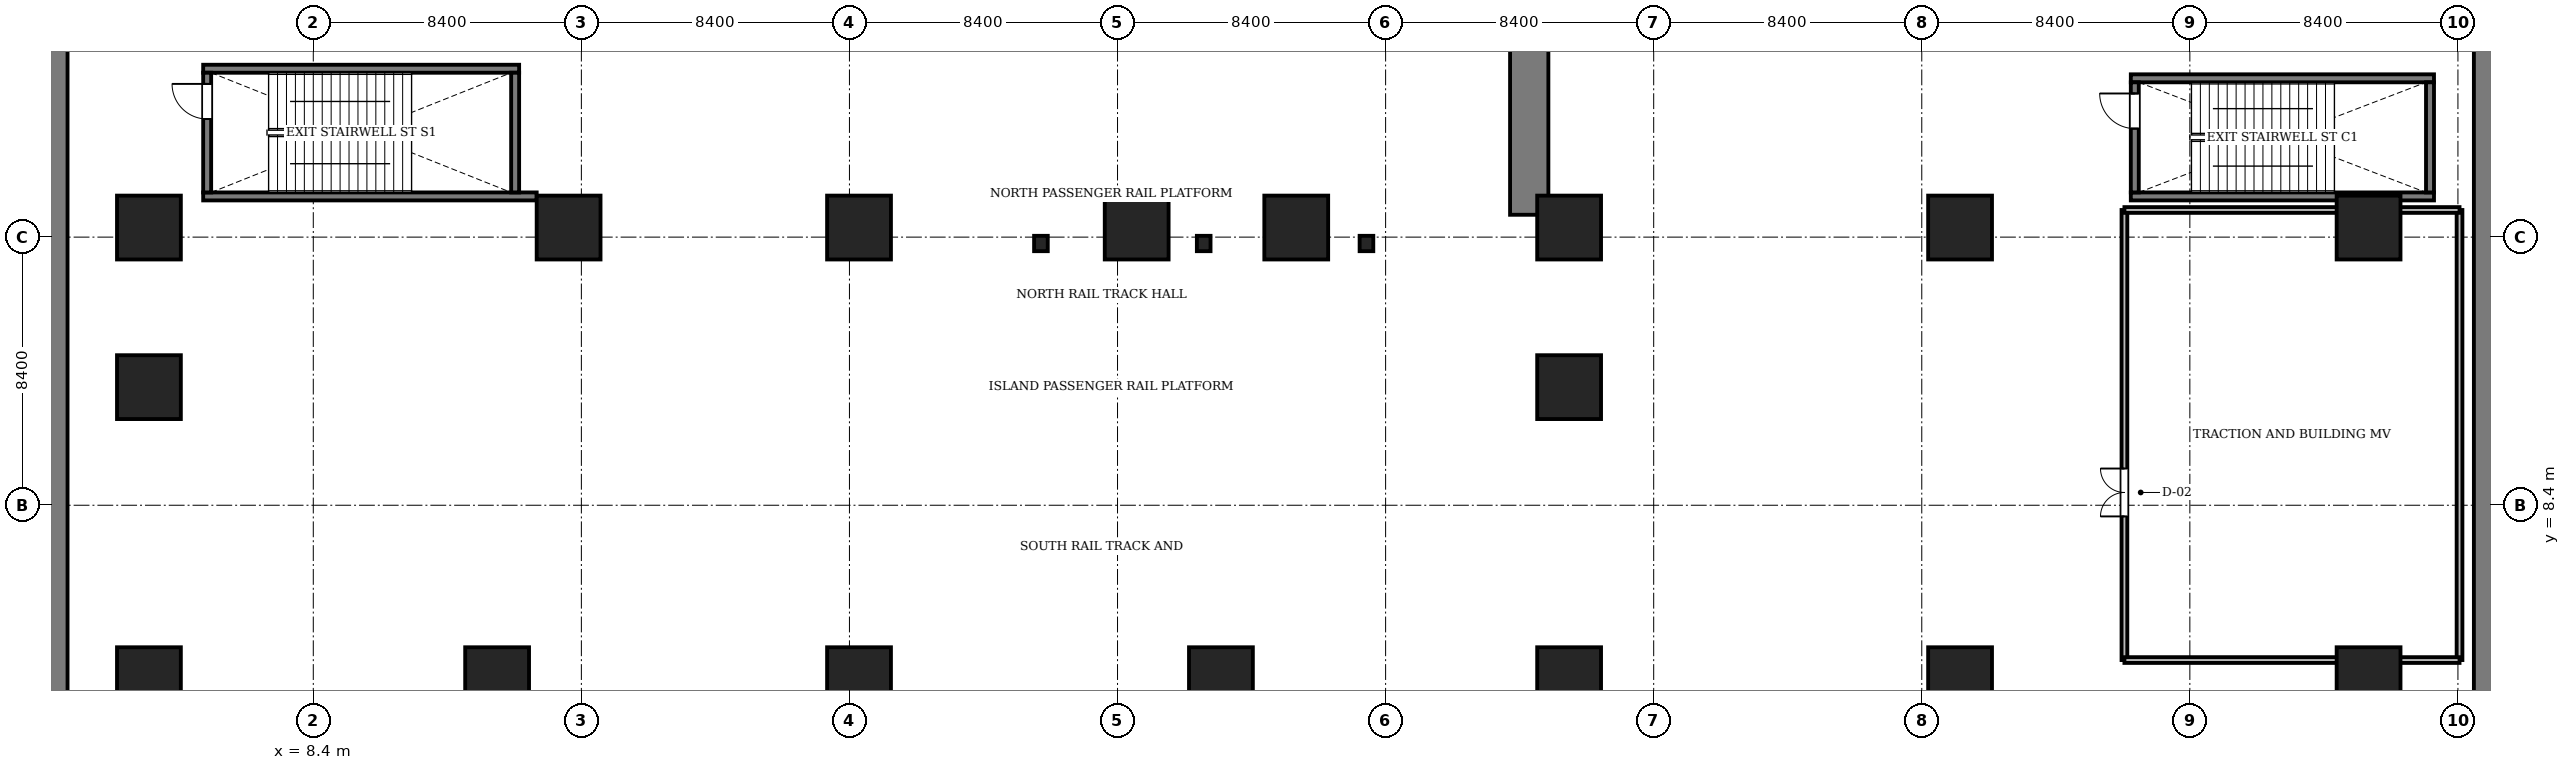
"""IFC4 building model, lengths in metres.
Left out: names, types, materials, properties, quantities, classifications, styles, units other than length and angle.
Written with IfcOpenShell. Run it as: python <this file> out.ifc"""

import sys

from ifc_helpers import new_model, si_unit, direction, frame, frame_2d, origin, origin_2d, place, context, subcontext, project, spatial, rectangle, i_section, extrude, source, transform, mapped, element, fill, save


model = new_model("IFC4")
c1 = context("Model", 3, precision=1e-05, world=origin(), true_north=direction((0.0, 1.0)))
c2 = subcontext(c1, "Body", "Model", "MODEL_VIEW")
j1 = project(units=[si_unit("LENGTHUNIT", "METRE"), si_unit("PLANEANGLEUNIT", "RADIAN")], contexts=[c1])
p1 = place(None, origin())
s1 = spatial("IfcSite", under=j1, at=p1, CompositionType="ELEMENT")
p2 = place(p1, origin())
s2 = spatial("IfcBuilding", under=s1, at=p2, CompositionType="ELEMENT")
p3 = place(p2, frame((0.0, 0.0, -6.0)))
s3 = spatial("IfcBuildingStorey", under=s2, at=p3, CompositionType="ELEMENT", Elevation=-6.0)
m1 = source(origin(), c2, "Body", "SweptSolid", [
    extrude(rectangle(XDim=13.15, YDim=1.2, at=frame_2d((6.575, 0.0))), origin(), (0.0, 0.0, 1.0), 5.6),
])
p4 = place(p3, frame((46.5, 17.5, 0.0), z_axis=(0.0, 0.0, 1.0), x_axis=(0.0, 1.0, 0.0)))
e1 = element("IfcWall", 1, at=p4, inside=s3, PredefinedType="SHEAR", context=c2, shape_type="MappedRepresentation", body=[
    mapped(m1, transform((0.0, 0.0, 0.0), scale=1.0)),
])
m2 = source(origin(), c2, "Body", "SweptSolid", [
    extrude(rectangle(XDim=49.0, YDim=0.7, at=frame_2d((24.5, 0.0))), origin(), (0.0, 0.0, 1.0), 5.6),
])
for number, where, z_axis, x_axis in (
    (2, (0.35, 0.7, 0.0), (0.0, 0.0, 1.0), (0.0, 1.0, 0.0)),
    (3, (76.45, 0.7, 0.0), (0.0, 0.0, 1.0), (0.0, 1.0, 0.0)),
):
    element("IfcWall", number, at=place(p3, frame(where, z_axis=z_axis, x_axis=x_axis)), inside=s3, PredefinedType="SOLIDWALL", context=c2, shape_type="MappedRepresentation", body=[
        mapped(m2, transform((0.0, 0.0, 0.0), scale=1.0)),
    ])
m3 = source(origin(), c2, "Body", "SweptSolid", [
    extrude(i_section(OverallWidth=0.428, OverallDepth=0.481, WebThickness=0.04, FlangeThickness=0.063, FilletRadius=0.015, at=origin_2d()), origin(), (0.0, 0.0, 1.0), 5.6),
])
for number, where, z_axis, x_axis in (
    (4, (31.2, 16.6, 0.0), (0.0, 0.0, 1.0), (1.0, 0.0, 0.0)),
    (5, (36.3, 16.6, 0.0), (0.0, 0.0, 1.0), (1.0, 0.0, 0.0)),
    (6, (41.4, 16.6, 0.0), (0.0, 0.0, 1.0), (1.0, 0.0, 0.0)),
):
    element("IfcColumn", number, at=place(p3, frame(where, z_axis=z_axis, x_axis=x_axis)), inside=s3, PredefinedType="COLUMN", context=c2, shape_type="MappedRepresentation", body=[
        mapped(m3, transform((0.0, 0.0, 0.0), scale=1.0)),
    ])
m4 = source(origin(), c2, "Body", "SweptSolid", [
    extrude(rectangle(XDim=2.0, YDim=2.0, at=origin_2d()), origin(), (0.0, 0.0, 1.0), 5.6),
])
for number, where, z_axis, x_axis in (
    (7, (3.25, 2.95, 0.0), (0.0, 0.0, 1.0), (1.0, 0.0, 0.0)),
    (8, (14.16, 2.95, 0.0), (0.0, 0.0, 1.0), (1.0, 0.0, 0.0)),
    (9, (25.5, 2.95, 0.0), (0.0, 0.0, 1.0), (1.0, 0.0, 0.0)),
    (10, (36.84, 2.95, 0.0), (0.0, 0.0, 1.0), (1.0, 0.0, 0.0)),
    (11, (47.75, 2.95, 0.0), (0.0, 0.0, 1.0), (1.0, 0.0, 0.0)),
    (12, (60.0, 2.95, 0.0), (0.0, 0.0, 1.0), (1.0, 0.0, 0.0)),
    (13, (72.8, 2.95, 0.0), (0.0, 0.0, 1.0), (1.0, 0.0, 0.0)),
    (14, (3.25, 12.1, 0.0), (0.0, 0.0, 1.0), (1.0, 0.0, 0.0)),
    (15, (47.75, 12.1, 0.0), (0.0, 0.0, 1.0), (1.0, 0.0, 0.0)),
    (16, (3.25, 17.1, 0.0), (0.0, 0.0, 1.0), (1.0, 0.0, 0.0)),
    (17, (16.4, 17.1, 0.0), (0.0, 0.0, 1.0), (1.0, 0.0, 0.0)),
    (18, (25.5, 17.1, 0.0), (0.0, 0.0, 1.0), (1.0, 0.0, 0.0)),
    (19, (34.2, 17.1, 0.0), (0.0, 0.0, 1.0), (1.0, 0.0, 0.0)),
    (20, (39.2, 17.1, 0.0), (0.0, 0.0, 1.0), (1.0, 0.0, 0.0)),
    (21, (47.75, 17.1, 0.0), (0.0, 0.0, 1.0), (1.0, 0.0, 0.0)),
    (22, (60.0, 17.1, 0.0), (0.0, 0.0, 1.0), (1.0, 0.0, 0.0)),
    (23, (72.8, 17.1, 0.0), (0.0, 0.0, 1.0), (1.0, 0.0, 0.0)),
):
    element("IfcColumn", number, at=place(p3, frame(where, z_axis=z_axis, x_axis=x_axis)), inside=s3, PredefinedType="COLUMN", context=c2, shape_type="MappedRepresentation", body=[
        mapped(m4, transform((0.0, 0.0, 0.0), scale=1.0)),
    ])
m5 = source(origin(), c2, "Body", "SweptSolid", [
    extrude(rectangle(XDim=10.45, YDim=0.25, at=frame_2d((5.225, 0.0))), origin(), (0.0, 0.0, 1.0), 5.8),
])
p5 = place(p3, frame((4.95, 18.075, 0.0), z_axis=(0.0, 0.0, 1.0), x_axis=(1.0, 0.0, 0.0)))
e24 = element("IfcWall", 24, at=p5, inside=s3, PredefinedType="SOLIDWALL", context=c2, shape_type="MappedRepresentation", body=[
    mapped(m5, transform((0.0, 0.0, 0.0), scale=1.0)),
])
m6 = source(origin(), c2, "Body", "SweptSolid", [
    extrude(rectangle(XDim=9.9, YDim=0.25, at=frame_2d((4.95, 0.0))), origin(), (0.0, 0.0, 1.0), 5.8),
])
p6 = place(p3, frame((4.95, 22.075, 0.0), z_axis=(0.0, 0.0, 1.0), x_axis=(1.0, 0.0, 0.0)))
e25 = element("IfcWall", 25, at=p6, inside=s3, PredefinedType="SOLIDWALL", context=c2, shape_type="MappedRepresentation", body=[
    mapped(m6, transform((0.0, 0.0, 0.0), scale=1.0)),
])
m7 = source(origin(), c2, "Body", "SweptSolid", [
    extrude(rectangle(XDim=3.75, YDim=0.25, at=frame_2d((1.875, 0.0))), origin(), (0.0, 0.0, 1.0), 5.8),
])
p7 = place(p3, frame((14.725, 18.2, 0.0), z_axis=(0.0, 0.0, 1.0), x_axis=(0.0, 1.0, 0.0)))
e26 = element("IfcWall", 26, at=p7, inside=s3, PredefinedType="SOLIDWALL", context=c2, shape_type="MappedRepresentation", body=[
    mapped(m7, transform((0.0, 0.0, 0.0), scale=1.0)),
])
p8 = place(p3, frame((5.075, 18.2, 0.0), z_axis=(0.0, 0.0, 1.0), x_axis=(0.0, 1.0, 0.0)))
e27 = element("IfcWall", 27, at=p8, inside=s3, PredefinedType="SOLIDWALL", context=c2, shape_type="MappedRepresentation", body=[
    mapped(m7, transform((0.0, 0.0, 0.0), scale=1.0)),
])
m8 = source(origin(), c2, "Body", "SweptSolid", [
    extrude(rectangle(XDim=1.1, YDim=2.2, at=frame_2d((0.55, 1.1))), frame((0.0, 0.135, 0.0), z_axis=(0.0, -1.0, 0.0), x_axis=(1.0, 0.0, 0.0)), (0.0, 0.0, 1.0), 0.27),
])
p9 = place(p8, frame((2.3, 0.0, 0.0)))
e28 = element("IfcOpeningElement", 28, at=p9, cuts=e27, PredefinedType="OPENING", context=c2, shape_type="MappedRepresentation", body=[
    mapped(m8, transform((0.0, 0.0, 0.0), scale=1.0)),
])
m9 = source(origin(), c2, "Body", "SweptSolid", [
    extrude(rectangle(XDim=9.5, YDim=0.25, at=frame_2d((4.75, 0.0))), origin(), (0.0, 0.0, 1.0), 5.8),
])
for number, where, z_axis, x_axis in (
    (29, (65.35, 18.075, 0.0), (0.0, 0.0, 1.0), (1.0, 0.0, 0.0)),
    (30, (65.35, 21.775, 0.0), (0.0, 0.0, 1.0), (1.0, 0.0, 0.0)),
):
    element("IfcWall", number, at=place(p3, frame(where, z_axis=z_axis, x_axis=x_axis)), inside=s3, PredefinedType="SOLIDWALL", context=c2, shape_type="MappedRepresentation", body=[
        mapped(m9, transform((0.0, 0.0, 0.0), scale=1.0)),
    ])
m10 = source(origin(), c2, "Body", "SweptSolid", [
    extrude(rectangle(XDim=3.45, YDim=0.25, at=frame_2d((1.725, 0.0))), origin(), (0.0, 0.0, 1.0), 5.8),
])
p10 = place(p3, frame((74.725, 18.2, 0.0), z_axis=(0.0, 0.0, 1.0), x_axis=(0.0, 1.0, 0.0)))
e31 = element("IfcWall", 31, at=p10, inside=s3, PredefinedType="SOLIDWALL", context=c2, shape_type="MappedRepresentation", body=[
    mapped(m10, transform((0.0, 0.0, 0.0), scale=1.0)),
])
p11 = place(p3, frame((65.475, 18.2, 0.0), z_axis=(0.0, 0.0, 1.0), x_axis=(0.0, 1.0, 0.0)))
e32 = element("IfcWall", 32, at=p11, inside=s3, PredefinedType="SOLIDWALL", context=c2, shape_type="MappedRepresentation", body=[
    mapped(m10, transform((0.0, 0.0, 0.0), scale=1.0)),
])
p12 = place(p11, frame((2.0, 0.0, 0.0)))
e33 = element("IfcOpeningElement", 33, at=p12, cuts=e32, PredefinedType="OPENING", context=c2, shape_type="MappedRepresentation", body=[
    mapped(m8, transform((0.0, 0.0, 0.0), scale=1.0)),
])
m11 = source(origin(), c2, "Body", "SweptSolid", [
    extrude(rectangle(XDim=14.1, YDim=0.18, at=frame_2d((7.05, 0.0))), origin(), (0.0, 0.0, 1.0), 5.068),
])
p13 = place(p3, frame((65.15, 3.55, 0.0), z_axis=(0.0, 0.0, 1.0), x_axis=(0.0, 1.0, 0.0)))
e34 = element("IfcWall", 34, at=p13, inside=s3, PredefinedType="PARTITIONING", context=c2, shape_type="MappedRepresentation", body=[
    mapped(m11, transform((0.0, 0.0, 0.0), scale=1.0)),
])
m12 = source(origin(), c2, "Body", "SweptSolid", [
    extrude(rectangle(XDim=1.5, YDim=2.3, at=frame_2d((0.75, 1.15))), frame((0.0, 0.1, 0.0), z_axis=(0.0, -1.0, 0.0), x_axis=(1.0, 0.0, 0.0)), (0.0, 0.0, 1.0), 0.2),
])
p14 = place(p13, frame((4.5, 0.0, 0.0)))
e35 = element("IfcOpeningElement", 35, at=p14, cuts=e34, PredefinedType="OPENING", context=c2, shape_type="MappedRepresentation", body=[
    mapped(m12, transform((0.0, 0.0, 0.0), scale=1.0)),
])
p15 = place(p3, frame((75.65, 3.55, 0.0), z_axis=(0.0, 0.0, 1.0), x_axis=(0.0, 1.0, 0.0)))
e36 = element("IfcWall", 36, at=p15, inside=s3, PredefinedType="PARTITIONING", context=c2, shape_type="MappedRepresentation", body=[
    mapped(m11, transform((0.0, 0.0, 0.0), scale=1.0)),
])
m13 = source(origin(), c2, "Body", "SweptSolid", [
    extrude(rectangle(XDim=10.5, YDim=0.18, at=frame_2d((5.25, 0.0))), origin(), (0.0, 0.0, 1.0), 4.992),
])
p16 = place(p3, frame((65.15, 3.55, 0.0), z_axis=(0.0, 0.0, 1.0), x_axis=(1.0, 0.0, 0.0)))
e37 = element("IfcWall", 37, at=p16, inside=s3, PredefinedType="PARTITIONING", context=c2, shape_type="MappedRepresentation", body=[
    mapped(m13, transform((0.0, 0.0, 0.0), scale=1.0)),
])
m14 = source(origin(), c2, "Body", "SweptSolid", [
    extrude(rectangle(XDim=10.5, YDim=0.18, at=frame_2d((5.25, 0.0))), origin(), (0.0, 0.0, 1.0), 5.6),
])
p17 = place(p3, frame((65.15, 17.65, 0.0), z_axis=(0.0, 0.0, 1.0), x_axis=(1.0, 0.0, 0.0)))
e38 = element("IfcWall", 38, at=p17, inside=s3, PredefinedType="PARTITIONING", context=c2, shape_type="MappedRepresentation", body=[
    mapped(m14, transform((0.0, 0.0, 0.0), scale=1.0)),
])
m15 = source(origin(), c2, "Body", "SweptSolid", [
    extrude(rectangle(XDim=1.1, YDim=2.2, at=frame_2d((0.55, 1.1))), frame((0.0, 0.025, 0.0), z_axis=(0.0, -1.0, 0.0), x_axis=(1.0, 0.0, 0.0)), (0.0, 0.0, 1.0), 0.05),
])
p18 = place(p9, origin())
e39 = element("IfcDoor", 39, at=p18, inside=s3, OperationType="SINGLE_SWING_RIGHT", PredefinedType="DOOR", context=c2, shape_type="MappedRepresentation", body=[
    mapped(m15, transform((0.0, 0.0, 0.0), scale=1.0)),
])
fill(e28, e39)
p19 = place(p12, origin())
e40 = element("IfcDoor", 40, at=p19, inside=s3, OperationType="SINGLE_SWING_RIGHT", PredefinedType="DOOR", context=c2, shape_type="MappedRepresentation", body=[
    mapped(m15, transform((0.0, 0.0, 0.0), scale=1.0)),
])
fill(e33, e40)
m16 = source(origin(), c2, "Body", "SweptSolid", [
    extrude(rectangle(XDim=1.5, YDim=2.3, at=frame_2d((0.75, 1.15))), frame((0.0, 0.025, 0.0), z_axis=(0.0, -1.0, 0.0), x_axis=(1.0, 0.0, 0.0)), (0.0, 0.0, 1.0), 0.05),
])
p20 = place(p14, origin())
e41 = element("IfcDoor", 41, at=p20, inside=s3, OperationType="DOUBLE_DOOR_SINGLE_SWING", PredefinedType="DOOR", context=c2, shape_type="MappedRepresentation", body=[
    mapped(m16, transform((0.0, 0.0, 0.0), scale=1.0)),
])
fill(e35, e41)
save(model, sys.argv[1])
